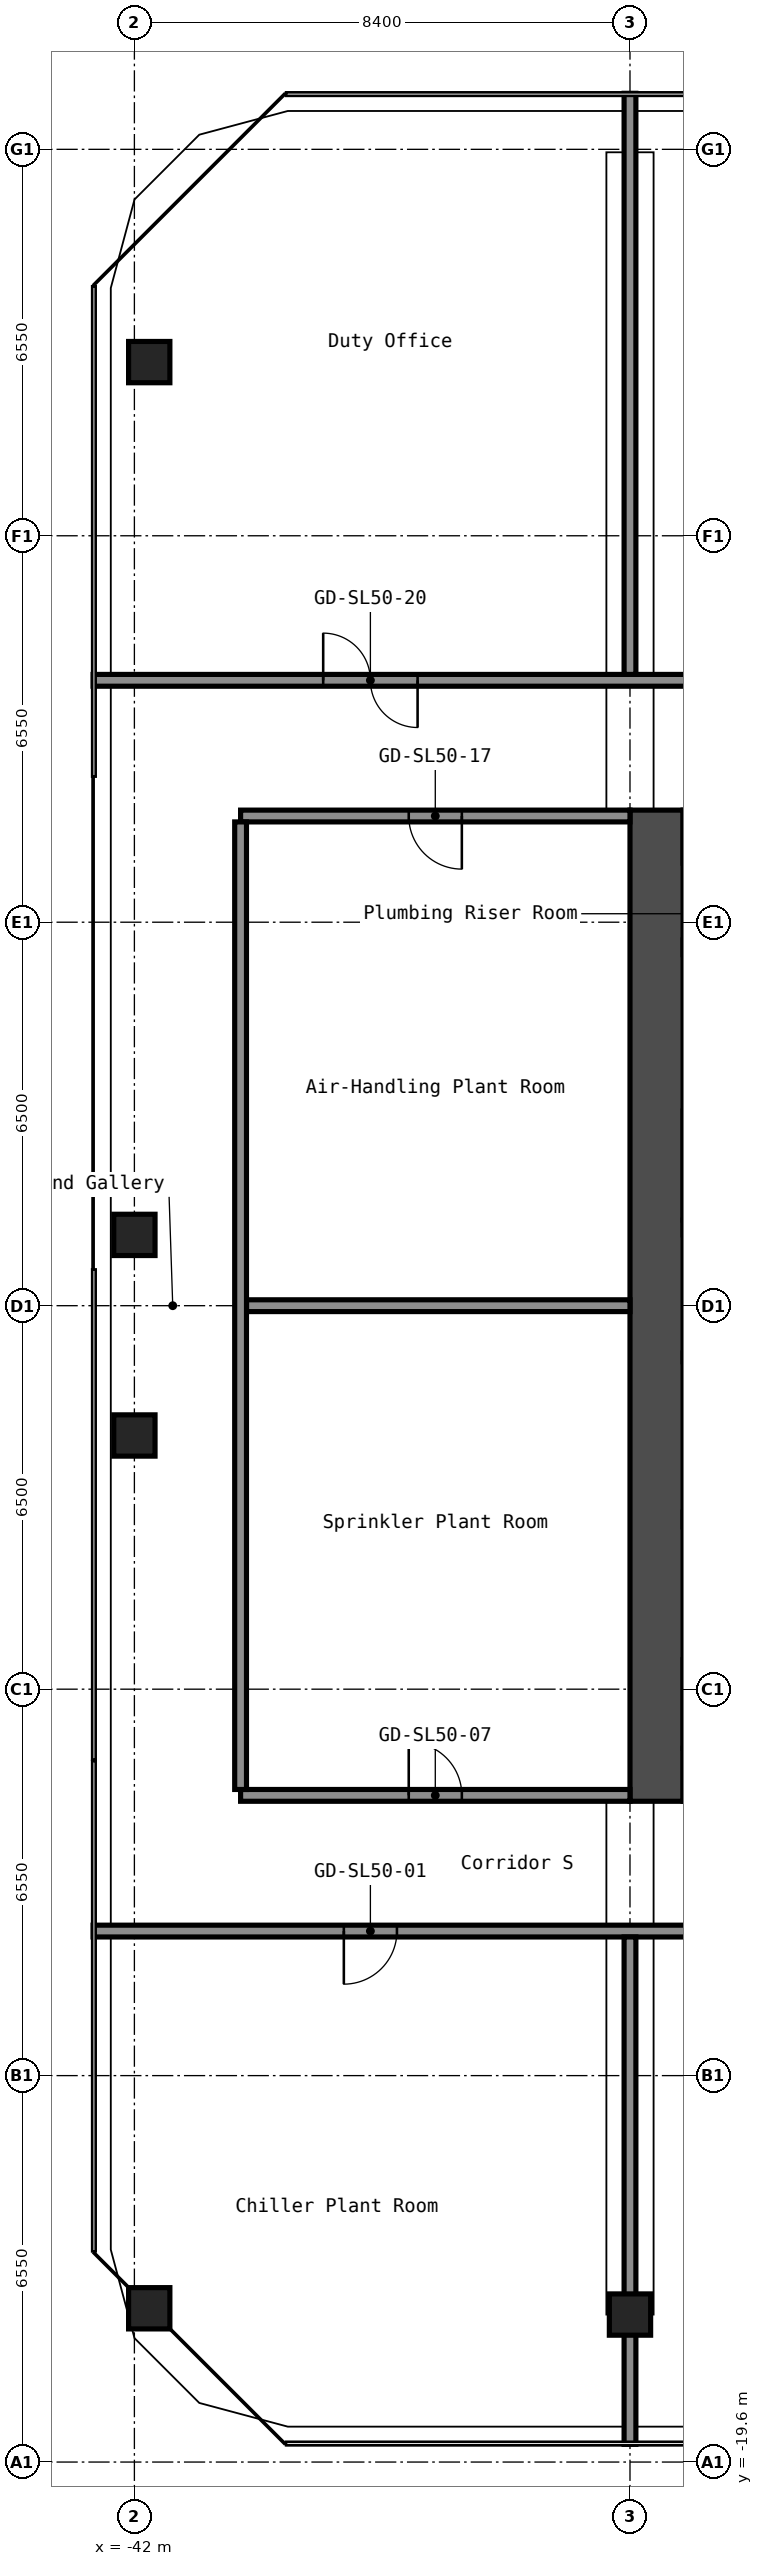
"""IFC4 building model, lengths in metres.
Left out: names, types, materials, properties, quantities, classifications, styles, units other than length and angle.
Written with IfcOpenShell. Run it as: python <this file> out.ifc"""

import sys

from ifc_helpers import new_model, si_unit, direction, frame, frame_2d, origin, origin_2d, place, context, subcontext, project, spatial, rectangle, hollow_rectangle, extrude, element, fill, save


model = new_model("IFC4")
c1 = context("Model", 3, precision=1e-05, world=origin(), true_north=direction((0.0, 1.0)))
c2 = subcontext(c1, "Body", "Model", "MODEL_VIEW")
j1 = project(units=[si_unit("LENGTHUNIT", "METRE"), si_unit("PLANEANGLEUNIT", "RADIAN")], contexts=[c1])
p1 = place(None, origin())
s1 = spatial("IfcSite", under=j1, at=p1, CompositionType="ELEMENT")
p2 = place(p1, origin())
s2 = spatial("IfcBuilding", under=s1, at=p2, CompositionType="ELEMENT")
p3 = place(p2, frame((0.0, 0.0, 175.8)))
s3 = spatial("IfcBuildingStorey", under=s2, at=p3, CompositionType="ELEMENT", Elevation=175.8)
for number, where, z_axis, x_axis in (
    (1, (-41.749, -16.994, 0.0), (0.0, 0.0, 1.0), (1.0, 0.0, 0.0)),
    (2, (-42.0, -2.2, 0.0), (0.0, 0.0, 1.0), (1.0, 0.0, 0.0)),
    (3, (-42.0, 1.2, 0.0), (0.0, 0.0, 1.0), (1.0, 0.0, 0.0)),
    (4, (-41.749, 15.994, 0.0), (0.0, 0.0, 1.0), (1.0, 0.0, 0.0)),
    (5, (-33.6, -17.1, 0.0), (0.0, 0.0, 1.0), (1.0, 0.0, 0.0)),
):
    element("IfcColumn", number, at=place(p3, frame(where, z_axis=z_axis, x_axis=x_axis)), inside=s3, PredefinedType="COLUMN", context=c2, shape_type="SweptSolid", body=[
        extrude(hollow_rectangle(XDim=0.7, YDim=0.7, WallThickness=0.028, at=origin_2d()), origin(), (0.0, 0.0, 1.0), 4.1),
    ])
p4 = place(p3, frame((-33.15, -8.4, 0.0), z_axis=(0.0, 0.0, 1.0), x_axis=(0.0, 1.0, 0.0)))
e6 = element("IfcWall", 6, at=p4, inside=s3, PredefinedType="SHEAR", context=c2, shape_type="SweptSolid", body=[
    extrude(rectangle(XDim=16.8, YDim=0.9, at=frame_2d((8.4, 0.0))), origin(), (0.0, 0.0, 1.0), 4.1),
])
p5 = place(p3, frame((-32.7, 1.325, 0.0), z_axis=(0.0, 0.0, 1.0), x_axis=(1.0, 0.0, 0.0)))
e7 = element("IfcWall", 7, at=p5, inside=s3, PredefinedType="SHEAR", context=c2, shape_type="SweptSolid", body=[
    extrude(rectangle(XDim=5.05, YDim=0.25, at=frame_2d((2.525, 0.0))), origin(), (0.0, 0.0, 1.0), 4.1),
])
p6 = place(p5, frame((3.3, 0.0, 0.0)))
e8 = element("IfcOpeningElement", 8, at=p6, cuts=e7, PredefinedType="OPENING", context=c2, shape_type="SweptSolid", body=[
    extrude(rectangle(XDim=1.2, YDim=2.1, at=frame_2d((0.6, 1.05))), frame((0.0, 0.135, 0.0), z_axis=(0.0, -1.0, 0.0), x_axis=(1.0, 0.0, 0.0)), (0.0, 0.0, 1.0), 0.27),
])
p7 = place(p3, frame((-32.7, -3.625, 0.0), z_axis=(0.0, 0.0, 1.0), x_axis=(1.0, 0.0, 0.0)))
e9 = element("IfcWall", 9, at=p7, inside=s3, PredefinedType="SHEAR", context=c2, shape_type="SweptSolid", body=[
    extrude(rectangle(XDim=4.55, YDim=0.25, at=frame_2d((2.275, 0.0))), origin(), (0.0, 0.0, 1.0), 4.1),
])
p8 = place(p7, frame((2.85, 0.0, 0.0)))
e10 = element("IfcOpeningElement", 10, at=p8, cuts=e9, PredefinedType="OPENING", context=c2, shape_type="SweptSolid", body=[
    extrude(rectangle(XDim=1.1, YDim=2.1, at=frame_2d((0.55, 1.05))), frame((0.0, 0.135, 0.0), z_axis=(0.0, -1.0, 0.0), x_axis=(1.0, 0.0, 0.0)), (0.0, 0.0, 1.0), 0.27),
])
p9 = place(p7, frame((0.6, 0.0, 0.0)))
e11 = element("IfcOpeningElement", 11, at=p9, cuts=e9, PredefinedType="OPENING", context=c2, shape_type="SweptSolid", body=[
    extrude(rectangle(XDim=1.1, YDim=2.1, at=frame_2d((0.55, 1.05))), frame((0.0, 0.135, 0.0), z_axis=(0.0, -1.0, 0.0), x_axis=(1.0, 0.0, 0.0)), (0.0, 0.0, 1.0), 0.27),
])
p10 = place(p3, frame((-32.7, -6.75, 0.0), z_axis=(0.0, 0.0, 1.0), x_axis=(1.0, 0.0, 0.0)))
e12 = element("IfcWall", 12, at=p10, inside=s3, PredefinedType="SHEAR", context=c2, shape_type="SweptSolid", body=[
    extrude(rectangle(XDim=4.55, YDim=1.5, at=frame_2d((2.275, 0.0))), origin(), (0.0, 0.0, 1.0), 4.1),
])
p11 = place(p3, frame((-32.7, -0.875, 0.0), z_axis=(0.0, 0.0, 1.0), x_axis=(1.0, 0.0, 0.0)))
e13 = element("IfcWall", 13, at=p11, inside=s3, PredefinedType="PARTITIONING", context=c2, shape_type="SweptSolid", body=[
    extrude(rectangle(XDim=2.3, YDim=0.15, at=frame_2d((1.15, 0.0))), origin(), (0.0, 0.0, 1.0), 4.1),
])
p12 = place(p3, frame((-42.7, -10.6, 0.0), z_axis=(0.0, 0.0, 1.0), x_axis=(1.0, 0.0, 0.0)))
e14 = element("IfcWall", 14, at=p12, inside=s3, PredefinedType="PARTITIONING", context=c2, shape_type="SweptSolid", body=[
    extrude(rectangle(XDim=25.9, YDim=0.2, at=frame_2d((12.95, 0.0))), origin(), (0.0, 0.0, 1.0), 4.1),
])
p13 = place(p12, frame((4.25, 0.0, 0.0)))
e15 = element("IfcOpeningElement", 15, at=p13, cuts=e14, PredefinedType="OPENING", context=c2, shape_type="SweptSolid", body=[
    extrude(rectangle(XDim=0.9, YDim=2.1, at=frame_2d((0.45, 1.05))), frame((0.0, 0.11, 0.0), z_axis=(0.0, -1.0, 0.0), x_axis=(1.0, 0.0, 0.0)), (0.0, 0.0, 1.0), 0.22),
])
p14 = place(p12, frame((12.5, 0.0, 0.0)))
e16 = element("IfcOpeningElement", 16, at=p14, cuts=e14, PredefinedType="OPENING", context=c2, shape_type="SweptSolid", body=[
    extrude(rectangle(XDim=1.6, YDim=2.1, at=frame_2d((0.8, 1.05))), frame((0.0, 0.11, 0.0), z_axis=(0.0, -1.0, 0.0), x_axis=(1.0, 0.0, 0.0)), (0.0, 0.0, 1.0), 0.22),
])
p15 = place(p12, frame((21.25, 0.0, 0.0)))
e17 = element("IfcOpeningElement", 17, at=p15, cuts=e14, PredefinedType="OPENING", context=c2, shape_type="SweptSolid", body=[
    extrude(rectangle(XDim=0.9, YDim=2.1, at=frame_2d((0.45, 1.05))), frame((0.0, 0.11, 0.0), z_axis=(0.0, -1.0, 0.0), x_axis=(1.0, 0.0, 0.0)), (0.0, 0.0, 1.0), 0.22),
])
p16 = place(p3, frame((-40.2, -8.3, 0.0), z_axis=(0.0, 0.0, 1.0), x_axis=(1.0, 0.0, 0.0)))
e18 = element("IfcWall", 18, at=p16, inside=s3, PredefinedType="PARTITIONING", context=c2, shape_type="SweptSolid", body=[
    extrude(rectangle(XDim=6.6, YDim=0.2, at=frame_2d((3.3, 0.0))), origin(), (0.0, 0.0, 1.0), 4.1),
])
p17 = place(p16, frame((2.85, 0.0, 0.0)))
e19 = element("IfcOpeningElement", 19, at=p17, cuts=e18, PredefinedType="OPENING", context=c2, shape_type="SweptSolid", body=[
    extrude(rectangle(XDim=0.9, YDim=2.1, at=frame_2d((0.45, 1.05))), frame((0.0, 0.11, 0.0), z_axis=(0.0, -1.0, 0.0), x_axis=(1.0, 0.0, 0.0)), (0.0, 0.0, 1.0), 0.22),
])
p18 = place(p3, frame((-40.1, 0.0, 0.0), z_axis=(0.0, 0.0, 1.0), x_axis=(1.0, 0.0, 0.0)))
e20 = element("IfcWall", 20, at=p18, inside=s3, PredefinedType="PARTITIONING", context=c2, shape_type="SweptSolid", body=[
    extrude(rectangle(XDim=6.5, YDim=0.2, at=frame_2d((3.25, 0.0))), origin(), (0.0, 0.0, 1.0), 4.1),
])
p19 = place(p3, frame((-40.2, 8.3, 0.0), z_axis=(0.0, 0.0, 1.0), x_axis=(1.0, 0.0, 0.0)))
e21 = element("IfcWall", 21, at=p19, inside=s3, PredefinedType="PARTITIONING", context=c2, shape_type="SweptSolid", body=[
    extrude(rectangle(XDim=6.6, YDim=0.2, at=frame_2d((3.3, 0.0))), origin(), (0.0, 0.0, 1.0), 4.1),
])
p20 = place(p19, frame((2.85, 0.0, 0.0)))
e22 = element("IfcOpeningElement", 22, at=p20, cuts=e21, PredefinedType="OPENING", context=c2, shape_type="SweptSolid", body=[
    extrude(rectangle(XDim=0.9, YDim=2.1, at=frame_2d((0.45, 1.05))), frame((0.0, 0.11, 0.0), z_axis=(0.0, -1.0, 0.0), x_axis=(1.0, 0.0, 0.0)), (0.0, 0.0, 1.0), 0.22),
])
p21 = place(p3, frame((-42.7, 10.6, 0.0), z_axis=(0.0, 0.0, 1.0), x_axis=(1.0, 0.0, 0.0)))
e23 = element("IfcWall", 23, at=p21, inside=s3, PredefinedType="PARTITIONING", context=c2, shape_type="SweptSolid", body=[
    extrude(rectangle(XDim=25.9, YDim=0.2, at=frame_2d((12.95, 0.0))), origin(), (0.0, 0.0, 1.0), 4.1),
])
p22 = place(p21, frame((3.9, 0.0, 0.0)))
e24 = element("IfcOpeningElement", 24, at=p22, cuts=e23, PredefinedType="OPENING", context=c2, shape_type="SweptSolid", body=[
    extrude(rectangle(XDim=1.6, YDim=2.1, at=frame_2d((0.8, 1.05))), frame((0.0, 0.11, 0.0), z_axis=(0.0, -1.0, 0.0), x_axis=(1.0, 0.0, 0.0)), (0.0, 0.0, 1.0), 0.22),
])
p23 = place(p21, frame((12.5, 0.0, 0.0)))
e25 = element("IfcOpeningElement", 25, at=p23, cuts=e23, PredefinedType="OPENING", context=c2, shape_type="SweptSolid", body=[
    extrude(rectangle(XDim=1.6, YDim=2.1, at=frame_2d((0.8, 1.05))), frame((0.0, 0.11, 0.0), z_axis=(0.0, -1.0, 0.0), x_axis=(1.0, 0.0, 0.0)), (0.0, 0.0, 1.0), 0.22),
])
p24 = place(p21, frame((20.9, 0.0, 0.0)))
e26 = element("IfcOpeningElement", 26, at=p24, cuts=e23, PredefinedType="OPENING", context=c2, shape_type="SweptSolid", body=[
    extrude(rectangle(XDim=1.6, YDim=2.1, at=frame_2d((0.8, 1.05))), frame((0.0, 0.11, 0.0), z_axis=(0.0, -1.0, 0.0), x_axis=(1.0, 0.0, 0.0)), (0.0, 0.0, 1.0), 0.22),
])
p25 = place(p3, frame((-40.2, -8.2, 0.0), z_axis=(0.0, 0.0, 1.0), x_axis=(0.0, 1.0, 0.0)))
e27 = element("IfcWall", 27, at=p25, inside=s3, PredefinedType="PARTITIONING", context=c2, shape_type="SweptSolid", body=[
    extrude(rectangle(XDim=16.4, YDim=0.2, at=frame_2d((8.2, 0.0))), origin(), (0.0, 0.0, 1.0), 4.1),
])
p26 = place(p3, frame((-33.6, -19.3, 0.0), z_axis=(0.0, 0.0, 1.0), x_axis=(0.0, 1.0, 0.0)))
e28 = element("IfcWall", 28, at=p26, inside=s3, PredefinedType="PARTITIONING", context=c2, shape_type="SweptSolid", body=[
    extrude(rectangle(XDim=8.6, YDim=0.2, at=frame_2d((4.3, 0.0))), origin(), (0.0, 0.0, 1.0), 4.1),
])
p27 = place(p3, frame((-33.6, 10.7, 0.0), z_axis=(0.0, 0.0, 1.0), x_axis=(0.0, 1.0, 0.0)))
e29 = element("IfcWall", 29, at=p27, inside=s3, PredefinedType="PARTITIONING", context=c2, shape_type="SweptSolid", body=[
    extrude(rectangle(XDim=9.85, YDim=0.2, at=frame_2d((4.925, 0.0))), origin(), (0.0, 0.0, 1.0), 4.1),
])
p28 = place(p13, origin())
e30 = element("IfcDoor", 30, at=p28, inside=s3, OperationType="SINGLE_SWING_LEFT", PredefinedType="DOOR", context=c2, shape_type="SweptSolid", body=[
    extrude(rectangle(XDim=0.9, YDim=2.1, at=frame_2d((0.45, 1.05))), frame((0.0, 0.025, 0.0), z_axis=(0.0, -1.0, 0.0), x_axis=(1.0, 0.0, 0.0)), (0.0, 0.0, 1.0), 0.05),
])
fill(e15, e30)
p29 = place(p17, origin())
e31 = element("IfcDoor", 31, at=p29, inside=s3, OperationType="SINGLE_SWING_RIGHT", PredefinedType="DOOR", context=c2, shape_type="SweptSolid", body=[
    extrude(rectangle(XDim=0.9, YDim=2.1, at=frame_2d((0.45, 1.05))), frame((0.0, 0.025, 0.0), z_axis=(0.0, -1.0, 0.0), x_axis=(1.0, 0.0, 0.0)), (0.0, 0.0, 1.0), 0.05),
])
fill(e19, e31)
p30 = place(p20, origin())
e32 = element("IfcDoor", 32, at=p30, inside=s3, OperationType="SINGLE_SWING_RIGHT", PredefinedType="DOOR", context=c2, shape_type="SweptSolid", body=[
    extrude(rectangle(XDim=0.9, YDim=2.1, at=frame_2d((0.45, 1.05))), frame((0.0, 0.025, 0.0), z_axis=(0.0, -1.0, 0.0), x_axis=(1.0, 0.0, 0.0)), (0.0, 0.0, 1.0), 0.05),
])
fill(e22, e32)
p31 = place(p22, origin())
e33 = element("IfcDoor", 33, at=p31, inside=s3, OperationType="DOUBLE_DOOR_SINGLE_SWING", PredefinedType="DOOR", context=c2, shape_type="SweptSolid", body=[
    extrude(rectangle(XDim=1.6, YDim=2.1, at=frame_2d((0.8, 1.05))), frame((0.0, 0.025, 0.0), z_axis=(0.0, -1.0, 0.0), x_axis=(1.0, 0.0, 0.0)), (0.0, 0.0, 1.0), 0.05),
])
fill(e24, e33)
save(model, sys.argv[1])
